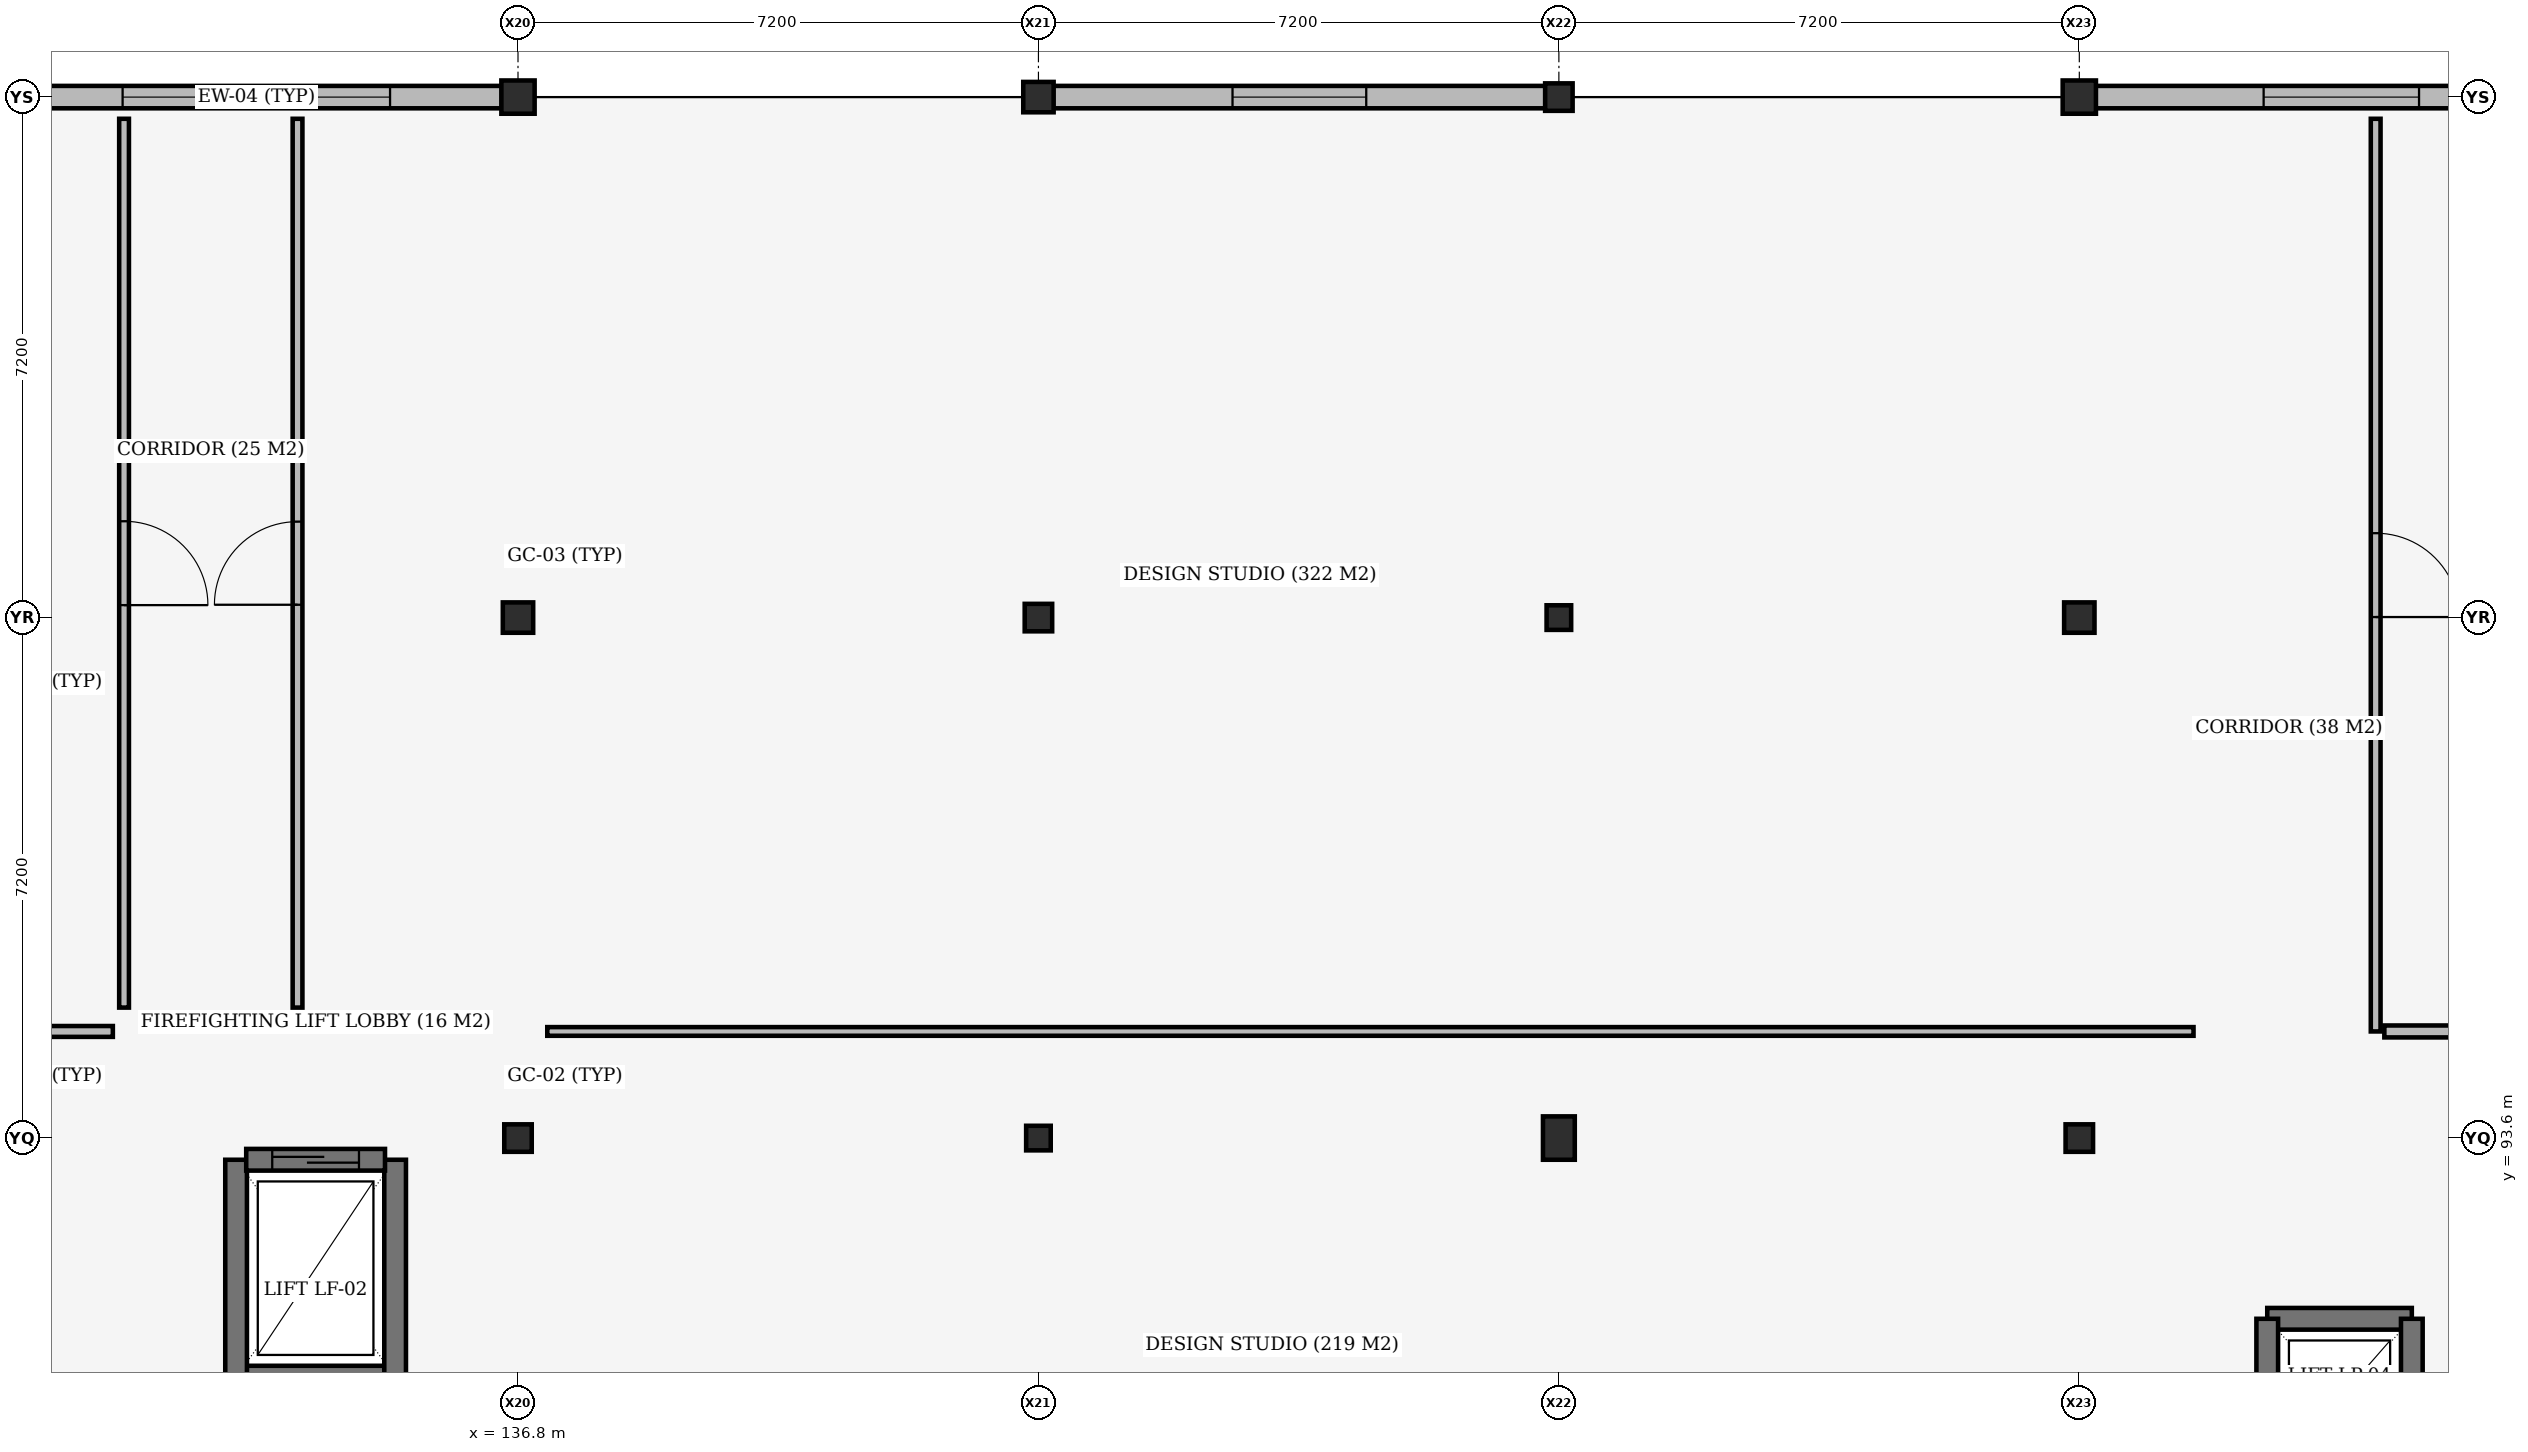
"""IFC4 building model, lengths in metres.
Left out: names, types, materials, properties, quantities, classifications, styles, units other than length and angle.
Written with IfcOpenShell. Run it as: python <this file> out.ifc"""

import sys

from ifc_helpers import new_model, si_unit, direction, frame, frame_2d, origin, origin_2d, place, context, subcontext, project, spatial, rectangle, extrude, element, fill, save


model = new_model("IFC4")
c1 = context("Model", 3, precision=1e-05, world=origin(), true_north=direction((0.0, 1.0)))
c2 = subcontext(c1, "Body", "Model", "MODEL_VIEW")
j1 = project(units=[si_unit("LENGTHUNIT", "METRE"), si_unit("PLANEANGLEUNIT", "RADIAN")], contexts=[c1])
p1 = place(None, origin())
s1 = spatial("IfcSite", under=j1, at=p1, CompositionType="ELEMENT")
p2 = place(p1, origin())
s2 = spatial("IfcBuilding", under=s1, at=p2, CompositionType="ELEMENT")
p3 = place(p2, frame((0.0, 0.0, 9.6)))
s3 = spatial("IfcBuildingStorey", under=s2, at=p3, CompositionType="ELEMENT", Elevation=9.6)
p4 = place(p3, frame((136.8, 93.6, 0.0), z_axis=(0.0, 0.0, 1.0), x_axis=(1.0, 0.0, 0.0)))
e1 = element("IfcColumn", 1, at=p4, inside=s3, PredefinedType="COLUMN", context=c2, shape_type="SweptSolid", body=[
    extrude(rectangle(XDim=0.38, YDim=0.38, at=origin_2d()), origin(), (0.0, 0.0, 1.0), 3.92),
])
p5 = place(p3, frame((136.8, 100.8, 0.0), z_axis=(0.0, 0.0, 1.0), x_axis=(1.0, 0.0, 0.0)))
e2 = element("IfcColumn", 2, at=p5, inside=s3, PredefinedType="COLUMN", context=c2, shape_type="SweptSolid", body=[
    extrude(rectangle(XDim=0.42, YDim=0.42, at=origin_2d()), origin(), (0.0, 0.0, 1.0), 3.92),
])
p6 = place(p3, frame((136.8, 108.0, 0.0), z_axis=(0.0, 0.0, 1.0), x_axis=(1.0, 0.0, 0.0)))
e3 = element("IfcColumn", 3, at=p6, inside=s3, PredefinedType="COLUMN", context=c2, shape_type="SweptSolid", body=[
    extrude(rectangle(XDim=0.46, YDim=0.46, at=origin_2d()), origin(), (0.0, 0.0, 1.0), 3.96),
])
p7 = place(p3, frame((144.0, 93.6, 0.0), z_axis=(0.0, 0.0, 1.0), x_axis=(1.0, 0.0, 0.0)))
e4 = element("IfcColumn", 4, at=p7, inside=s3, PredefinedType="COLUMN", context=c2, shape_type="SweptSolid", body=[
    extrude(rectangle(XDim=0.34, YDim=0.34, at=origin_2d()), origin(), (0.0, 0.0, 1.0), 3.92),
])
p8 = place(p3, frame((144.0, 100.8, 0.0), z_axis=(0.0, 0.0, 1.0), x_axis=(1.0, 0.0, 0.0)))
e5 = element("IfcColumn", 5, at=p8, inside=s3, PredefinedType="COLUMN", context=c2, shape_type="SweptSolid", body=[
    extrude(rectangle(XDim=0.38, YDim=0.38, at=origin_2d()), origin(), (0.0, 0.0, 1.0), 3.92),
])
p9 = place(p3, frame((144.0, 108.0, 0.0), z_axis=(0.0, 0.0, 1.0), x_axis=(1.0, 0.0, 0.0)))
e6 = element("IfcColumn", 6, at=p9, inside=s3, PredefinedType="COLUMN", context=c2, shape_type="SweptSolid", body=[
    extrude(rectangle(XDim=0.42, YDim=0.42, at=origin_2d()), origin(), (0.0, 0.0, 1.0), 3.96),
])
p10 = place(p3, frame((151.2, 93.6, 0.0), z_axis=(0.0, 0.0, 1.0), x_axis=(1.0, 0.0, 0.0)))
e7 = element("IfcColumn", 7, at=p10, inside=s3, PredefinedType="COLUMN", context=c2, shape_type="SweptSolid", body=[
    extrude(rectangle(XDim=0.44, YDim=0.6, at=origin_2d()), origin(), (0.0, 0.0, 1.0), 3.92),
])
p11 = place(p3, frame((151.2, 100.8, 0.0), z_axis=(0.0, 0.0, 1.0), x_axis=(1.0, 0.0, 0.0)))
e8 = element("IfcColumn", 8, at=p11, inside=s3, PredefinedType="COLUMN", context=c2, shape_type="SweptSolid", body=[
    extrude(rectangle(XDim=0.34, YDim=0.34, at=origin_2d()), origin(), (0.0, 0.0, 1.0), 3.92),
])
p12 = place(p3, frame((151.2, 108.0, 0.0), z_axis=(0.0, 0.0, 1.0), x_axis=(1.0, 0.0, 0.0)))
e9 = element("IfcColumn", 9, at=p12, inside=s3, PredefinedType="COLUMN", context=c2, shape_type="SweptSolid", body=[
    extrude(rectangle(XDim=0.38, YDim=0.38, at=origin_2d()), origin(), (0.0, 0.0, 1.0), 3.96),
])
p13 = place(p3, frame((158.4, 93.6, 0.0), z_axis=(0.0, 0.0, 1.0), x_axis=(1.0, 0.0, 0.0)))
e10 = element("IfcColumn", 10, at=p13, inside=s3, PredefinedType="COLUMN", context=c2, shape_type="SweptSolid", body=[
    extrude(rectangle(XDim=0.38, YDim=0.38, at=origin_2d()), origin(), (0.0, 0.0, 1.0), 3.92),
])
p14 = place(p3, frame((158.4, 100.8, 0.0), z_axis=(0.0, 0.0, 1.0), x_axis=(1.0, 0.0, 0.0)))
e11 = element("IfcColumn", 11, at=p14, inside=s3, PredefinedType="COLUMN", context=c2, shape_type="SweptSolid", body=[
    extrude(rectangle(XDim=0.42, YDim=0.42, at=origin_2d()), origin(), (0.0, 0.0, 1.0), 3.92),
])
p15 = place(p3, frame((158.4, 108.0, 0.0), z_axis=(0.0, 0.0, 1.0), x_axis=(1.0, 0.0, 0.0)))
e12 = element("IfcColumn", 12, at=p15, inside=s3, PredefinedType="COLUMN", context=c2, shape_type="SweptSolid", body=[
    extrude(rectangle(XDim=0.46, YDim=0.46, at=origin_2d()), origin(), (0.0, 0.0, 1.0), 3.96),
])
p16 = place(p3, frame((132.9, 90.3, 0.0), z_axis=(0.0, 0.0, 1.0), x_axis=(1.0, 0.0, 0.0)))
e13 = element("IfcWall", 13, at=p16, inside=s3, PredefinedType="SHEAR", context=c2, shape_type="SweptSolid", body=[
    extrude(rectangle(XDim=2.2, YDim=0.3, at=frame_2d((1.1, 0.0))), origin(), (0.0, 0.0, 1.0), 3.92),
])
for number, where, z_axis, x_axis in (
    (14, (132.9, 93.3, 0.0), (0.0, 0.0, 1.0), (0.0, -1.0, 0.0)),
    (15, (135.1, 90.3, 0.0), (0.0, 0.0, 1.0), (0.0, 1.0, 0.0)),
):
    element("IfcWall", number, at=place(p3, frame(where, z_axis=z_axis, x_axis=x_axis)), inside=s3, PredefinedType="SHEAR", context=c2, shape_type="SweptSolid", body=[
        extrude(rectangle(XDim=3.0, YDim=0.3, at=frame_2d((1.5, 0.0))), origin(), (0.0, 0.0, 1.0), 3.92),
    ])
p17 = place(p3, frame((163.0, 91.1, 0.0), z_axis=(0.0, 0.0, 1.0), x_axis=(-1.0, 0.0, 0.0)))
e16 = element("IfcWall", 16, at=p17, inside=s3, PredefinedType="SHEAR", context=c2, shape_type="SweptSolid", body=[
    extrude(rectangle(XDim=2.0, YDim=0.3, at=frame_2d((1.0, 0.0))), origin(), (0.0, 0.0, 1.0), 3.92),
])
for number, where, z_axis, x_axis in (
    (17, (161.0, 91.1, 0.0), (0.0, 0.0, 1.0), (0.0, -1.0, 0.0)),
    (18, (163.0, 88.9, 0.0), (0.0, 0.0, 1.0), (0.0, 1.0, 0.0)),
):
    element("IfcWall", number, at=place(p3, frame(where, z_axis=z_axis, x_axis=x_axis)), inside=s3, PredefinedType="SHEAR", context=c2, shape_type="SweptSolid", body=[
        extrude(rectangle(XDim=2.2, YDim=0.3, at=frame_2d((1.1, 0.0))), origin(), (0.0, 0.0, 1.0), 3.92),
    ])
p18 = place(p3, frame((129.782, 108.0, 0.0), z_axis=(0.0, 0.0, 1.0), x_axis=(1.0, 0.0, 0.0)))
e19 = element("IfcWall", 19, at=p18, inside=s3, PredefinedType="STANDARD", context=c2, shape_type="SweptSolid", body=[
    extrude(rectangle(XDim=6.796, YDim=0.31, at=frame_2d((3.398, 0.0))), origin(), (0.0, 0.0, 1.0), 3.92),
])
p19 = place(p18, frame((1.548, 0.0, 0.9)))
e20 = element("IfcOpeningElement", 20, at=p19, cuts=e19, PredefinedType="OPENING", context=c2, shape_type="SweptSolid", body=[
    extrude(rectangle(XDim=1.45, YDim=2.35, at=frame_2d((0.725, 1.175))), frame((0.0, 0.165, 0.0), z_axis=(0.0, -1.0, 0.0), x_axis=(1.0, 0.0, 0.0)), (0.0, 0.0, 1.0), 0.33),
])
p20 = place(p18, frame((3.798, 0.0, 0.9)))
e21 = element("IfcOpeningElement", 21, at=p20, cuts=e19, PredefinedType="OPENING", context=c2, shape_type="SweptSolid", body=[
    extrude(rectangle(XDim=1.45, YDim=2.35, at=frame_2d((0.725, 1.175))), frame((0.0, 0.165, 0.0), z_axis=(0.0, -1.0, 0.0), x_axis=(1.0, 0.0, 0.0)), (0.0, 0.0, 1.0), 0.33),
])
p21 = place(p3, frame((144.202, 108.0, 0.0), z_axis=(0.0, 0.0, 1.0), x_axis=(1.0, 0.0, 0.0)))
e22 = element("IfcWall", 22, at=p21, inside=s3, PredefinedType="STANDARD", context=c2, shape_type="SweptSolid", body=[
    extrude(rectangle(XDim=6.816, YDim=0.31, at=frame_2d((3.408, 0.0))), origin(), (0.0, 0.0, 1.0), 3.92),
])
p22 = place(p21, frame((2.483, 0.0, 0.9)))
e23 = element("IfcOpeningElement", 23, at=p22, cuts=e22, PredefinedType="OPENING", context=c2, shape_type="SweptSolid", body=[
    extrude(rectangle(XDim=1.85, YDim=2.35, at=frame_2d((0.925, 1.175))), frame((0.0, 0.165, 0.0), z_axis=(0.0, -1.0, 0.0), x_axis=(1.0, 0.0, 0.0)), (0.0, 0.0, 1.0), 0.33),
])
p23 = place(p3, frame((158.622, 108.0, 0.0), z_axis=(0.0, 0.0, 1.0), x_axis=(1.0, 0.0, 0.0)))
e24 = element("IfcWall", 24, at=p23, inside=s3, PredefinedType="STANDARD", context=c2, shape_type="SweptSolid", body=[
    extrude(rectangle(XDim=6.806, YDim=0.31, at=frame_2d((3.403, 0.0))), origin(), (0.0, 0.0, 1.0), 3.92),
])
p24 = place(p23, frame((2.328, 0.0, 0.85)))
e25 = element("IfcOpeningElement", 25, at=p24, cuts=e24, PredefinedType="OPENING", context=c2, shape_type="SweptSolid", body=[
    extrude(rectangle(XDim=2.15, YDim=2.7, at=frame_2d((1.075, 1.35))), frame((0.0, 0.165, 0.0), z_axis=(0.0, -1.0, 0.0), x_axis=(1.0, 0.0, 0.0)), (0.0, 0.0, 1.0), 0.33),
])
p25 = place(p3, frame((172.68, 107.88, 4.2), z_axis=(0.0, 0.0, 1.0), x_axis=(-1.0, 0.0, 0.0)))
e26 = element("IfcWall", 26, at=p25, inside=s3, PredefinedType="PARAPET", context=c2, shape_type="SweptSolid", body=[
    extrude(rectangle(XDim=50.16, YDim=0.215, at=frame_2d((25.08, 0.0))), origin(), (0.0, 0.0, 1.0), 0.85),
])
p26 = place(p3, frame((133.04, 93.3, 0.0), z_axis=(0.0, 0.0, 1.0), x_axis=(1.0, 0.0, 0.0)))
e27 = element("IfcWall", 27, at=p26, inside=s3, PredefinedType="SHEAR", context=c2, shape_type="SweptSolid", body=[
    extrude(rectangle(XDim=1.92, YDim=0.3, at=frame_2d((0.96, 0.0))), origin(), (0.0, 0.0, 1.0), 3.92),
])
p27 = place(p26, frame((0.36, 0.0, 0.0)))
e28 = element("IfcOpeningElement", 28, at=p27, cuts=e27, PredefinedType="OPENING", context=c2, shape_type="SweptSolid", body=[
    extrude(rectangle(XDim=1.2, YDim=2.1, at=frame_2d((0.6, 1.05))), frame((0.0, 0.16, 0.0), z_axis=(0.0, -1.0, 0.0), x_axis=(1.0, 0.0, 0.0)), (0.0, 0.0, 1.0), 0.32),
])
p28 = place(p3, frame((122.65, 95.075, 0.0), z_axis=(0.0, 0.0, 1.0), x_axis=(1.0, 0.0, 0.0)))
e29 = element("IfcWall", 29, at=p28, inside=s3, PredefinedType="PARTITIONING", context=c2, shape_type="SweptSolid", body=[
    extrude(rectangle(XDim=8.545, YDim=0.15, at=frame_2d((4.272, 0.0))), origin(), (0.0, 0.0, 1.0), 3.18),
])
p29 = place(p3, frame((131.35, 95.405, 0.0), z_axis=(0.0, 0.0, 1.0), x_axis=(0.0, 1.0, 0.0)))
e30 = element("IfcWall", 30, at=p29, inside=s3, PredefinedType="PARTITIONING", context=c2, shape_type="SweptSolid", body=[
    extrude(rectangle(XDim=12.295, YDim=0.135, at=frame_2d((6.147, 0.0))), origin(), (0.0, 0.0, 1.0), 3.18),
])
p30 = place(p29, frame((5.567, 0.0, 0.0)))
e31 = element("IfcOpeningElement", 31, at=p30, cuts=e30, PredefinedType="OPENING", context=c2, shape_type="SweptSolid", body=[
    extrude(rectangle(XDim=1.16, YDim=2.2, at=frame_2d((0.58, 1.1))), frame((0.0, 0.077, 0.0), z_axis=(0.0, -1.0, 0.0), x_axis=(1.0, 0.0, 0.0)), (0.0, 0.0, 1.0), 0.155),
])
p31 = place(p3, frame((137.205, 95.075, 0.0), z_axis=(0.0, 0.0, 1.0), x_axis=(1.0, 0.0, 0.0)))
e32 = element("IfcWall", 32, at=p31, inside=s3, PredefinedType="PARTITIONING", context=c2, shape_type="SweptSolid", body=[
    extrude(rectangle(XDim=22.775, YDim=0.12, at=frame_2d((11.387, 0.0))), origin(), (0.0, 0.0, 1.0), 3.24),
])
p32 = place(p3, frame((133.75, 95.405, 0.0), z_axis=(0.0, 0.0, 1.0), x_axis=(0.0, 1.0, 0.0)))
e33 = element("IfcWall", 33, at=p32, inside=s3, PredefinedType="PARTITIONING", context=c2, shape_type="SweptSolid", body=[
    extrude(rectangle(XDim=12.295, YDim=0.135, at=frame_2d((6.147, 0.0))), origin(), (0.0, 0.0, 1.0), 3.18),
])
p33 = place(p32, frame((5.573, 0.0, 0.0)))
e34 = element("IfcOpeningElement", 34, at=p33, cuts=e33, PredefinedType="OPENING", context=c2, shape_type="SweptSolid", body=[
    extrude(rectangle(XDim=1.15, YDim=2.2, at=frame_2d((0.575, 1.1))), frame((0.0, 0.077, 0.0), z_axis=(0.0, -1.0, 0.0), x_axis=(1.0, 0.0, 0.0)), (0.0, 0.0, 1.0), 0.155),
])
p34 = place(p3, frame((162.62, 95.075, 0.0), z_axis=(0.0, 0.0, 1.0), x_axis=(1.0, 0.0, 0.0)))
e35 = element("IfcWall", 35, at=p34, inside=s3, PredefinedType="PARTITIONING", context=c2, shape_type="SweptSolid", body=[
    extrude(rectangle(XDim=9.93, YDim=0.165, at=frame_2d((4.965, 0.0))), origin(), (0.0, 0.0, 1.0), 3.4),
])
p35 = place(p3, frame((162.5, 95.075, 0.0), z_axis=(0.0, 0.0, 1.0), x_axis=(0.0, 1.0, 0.0)))
e36 = element("IfcWall", 36, at=p35, inside=s3, PredefinedType="PARTITIONING", context=c2, shape_type="SweptSolid", body=[
    extrude(rectangle(XDim=12.625, YDim=0.135, at=frame_2d((6.312, 0.0))), origin(), (0.0, 0.0, 1.0), 3.24),
])
p36 = place(p35, frame((5.732, 0.0, 0.0)))
e37 = element("IfcOpeningElement", 37, at=p36, cuts=e36, PredefinedType="OPENING", context=c2, shape_type="SweptSolid", body=[
    extrude(rectangle(XDim=1.16, YDim=2.2, at=frame_2d((0.58, 1.1))), frame((0.0, 0.077, 0.0), z_axis=(0.0, -1.0, 0.0), x_axis=(1.0, 0.0, 0.0)), (0.0, 0.0, 1.0), 0.155),
])
p37 = place(p19, origin())
e38 = element("IfcWindow", 38, at=p37, inside=s3, PartitioningType="DOUBLE_PANEL_VERTICAL", PredefinedType="WINDOW", context=c2, shape_type="SweptSolid", body=[
    extrude(rectangle(XDim=1.45, YDim=2.35, at=frame_2d((0.725, 1.175))), frame((0.0, 0.03, 0.0), z_axis=(0.0, -1.0, 0.0), x_axis=(1.0, 0.0, 0.0)), (0.0, 0.0, 1.0), 0.06),
])
fill(e20, e38)
p38 = place(p20, origin())
e39 = element("IfcWindow", 39, at=p38, inside=s3, PartitioningType="DOUBLE_PANEL_VERTICAL", PredefinedType="WINDOW", context=c2, shape_type="SweptSolid", body=[
    extrude(rectangle(XDim=1.45, YDim=2.35, at=frame_2d((0.725, 1.175))), frame((0.0, 0.03, 0.0), z_axis=(0.0, -1.0, 0.0), x_axis=(1.0, 0.0, 0.0)), (0.0, 0.0, 1.0), 0.06),
])
fill(e21, e39)
p39 = place(p22, origin())
e40 = element("IfcWindow", 40, at=p39, inside=s3, PartitioningType="DOUBLE_PANEL_VERTICAL", PredefinedType="WINDOW", context=c2, shape_type="SweptSolid", body=[
    extrude(rectangle(XDim=1.85, YDim=2.35, at=frame_2d((0.925, 1.175))), frame((0.0, 0.03, 0.0), z_axis=(0.0, -1.0, 0.0), x_axis=(1.0, 0.0, 0.0)), (0.0, 0.0, 1.0), 0.06),
])
fill(e23, e40)
p40 = place(p24, origin())
e41 = element("IfcWindow", 41, at=p40, inside=s3, PartitioningType="DOUBLE_PANEL_VERTICAL", PredefinedType="WINDOW", context=c2, shape_type="SweptSolid", body=[
    extrude(rectangle(XDim=2.15, YDim=2.7, at=frame_2d((1.075, 1.35))), frame((0.0, 0.03, 0.0), z_axis=(0.0, -1.0, 0.0), x_axis=(1.0, 0.0, 0.0)), (0.0, 0.0, 1.0), 0.06),
])
fill(e25, e41)
p41 = place(p27, origin())
e42 = element("IfcDoor", 42, at=p41, inside=s3, OperationType="SLIDING_TO_LEFT", PredefinedType="DOOR", context=c2, shape_type="SweptSolid", body=[
    extrude(rectangle(XDim=1.2, YDim=2.1, at=frame_2d((0.6, 1.05))), frame((0.0, 0.025, 0.0), z_axis=(0.0, -1.0, 0.0), x_axis=(1.0, 0.0, 0.0)), (0.0, 0.0, 1.0), 0.05),
])
fill(e28, e42)
p42 = place(p30, origin())
e43 = element("IfcDoor", 43, at=p42, inside=s3, OperationType="SINGLE_SWING_RIGHT", PredefinedType="DOOR", context=c2, shape_type="SweptSolid", body=[
    extrude(rectangle(XDim=1.16, YDim=2.2, at=frame_2d((0.58, 1.1))), frame((0.0, 0.025, 0.0), z_axis=(0.0, -1.0, 0.0), x_axis=(1.0, 0.0, 0.0)), (0.0, 0.0, 1.0), 0.05),
])
fill(e31, e43)
p43 = place(p33, origin())
e44 = element("IfcDoor", 44, at=p43, inside=s3, OperationType="SINGLE_SWING_LEFT", PredefinedType="DOOR", context=c2, shape_type="SweptSolid", body=[
    extrude(rectangle(XDim=1.15, YDim=2.2, at=frame_2d((0.575, 1.1))), frame((0.0, 0.025, 0.0), z_axis=(0.0, -1.0, 0.0), x_axis=(1.0, 0.0, 0.0)), (0.0, 0.0, 1.0), 0.05),
])
fill(e34, e44)
p44 = place(p36, origin())
e45 = element("IfcDoor", 45, at=p44, inside=s3, OperationType="SINGLE_SWING_RIGHT", PredefinedType="DOOR", context=c2, shape_type="SweptSolid", body=[
    extrude(rectangle(XDim=1.16, YDim=2.2, at=frame_2d((0.58, 1.1))), frame((0.0, 0.025, 0.0), z_axis=(0.0, -1.0, 0.0), x_axis=(1.0, 0.0, 0.0)), (0.0, 0.0, 1.0), 0.05),
])
fill(e37, e45)
save(model, sys.argv[1])
